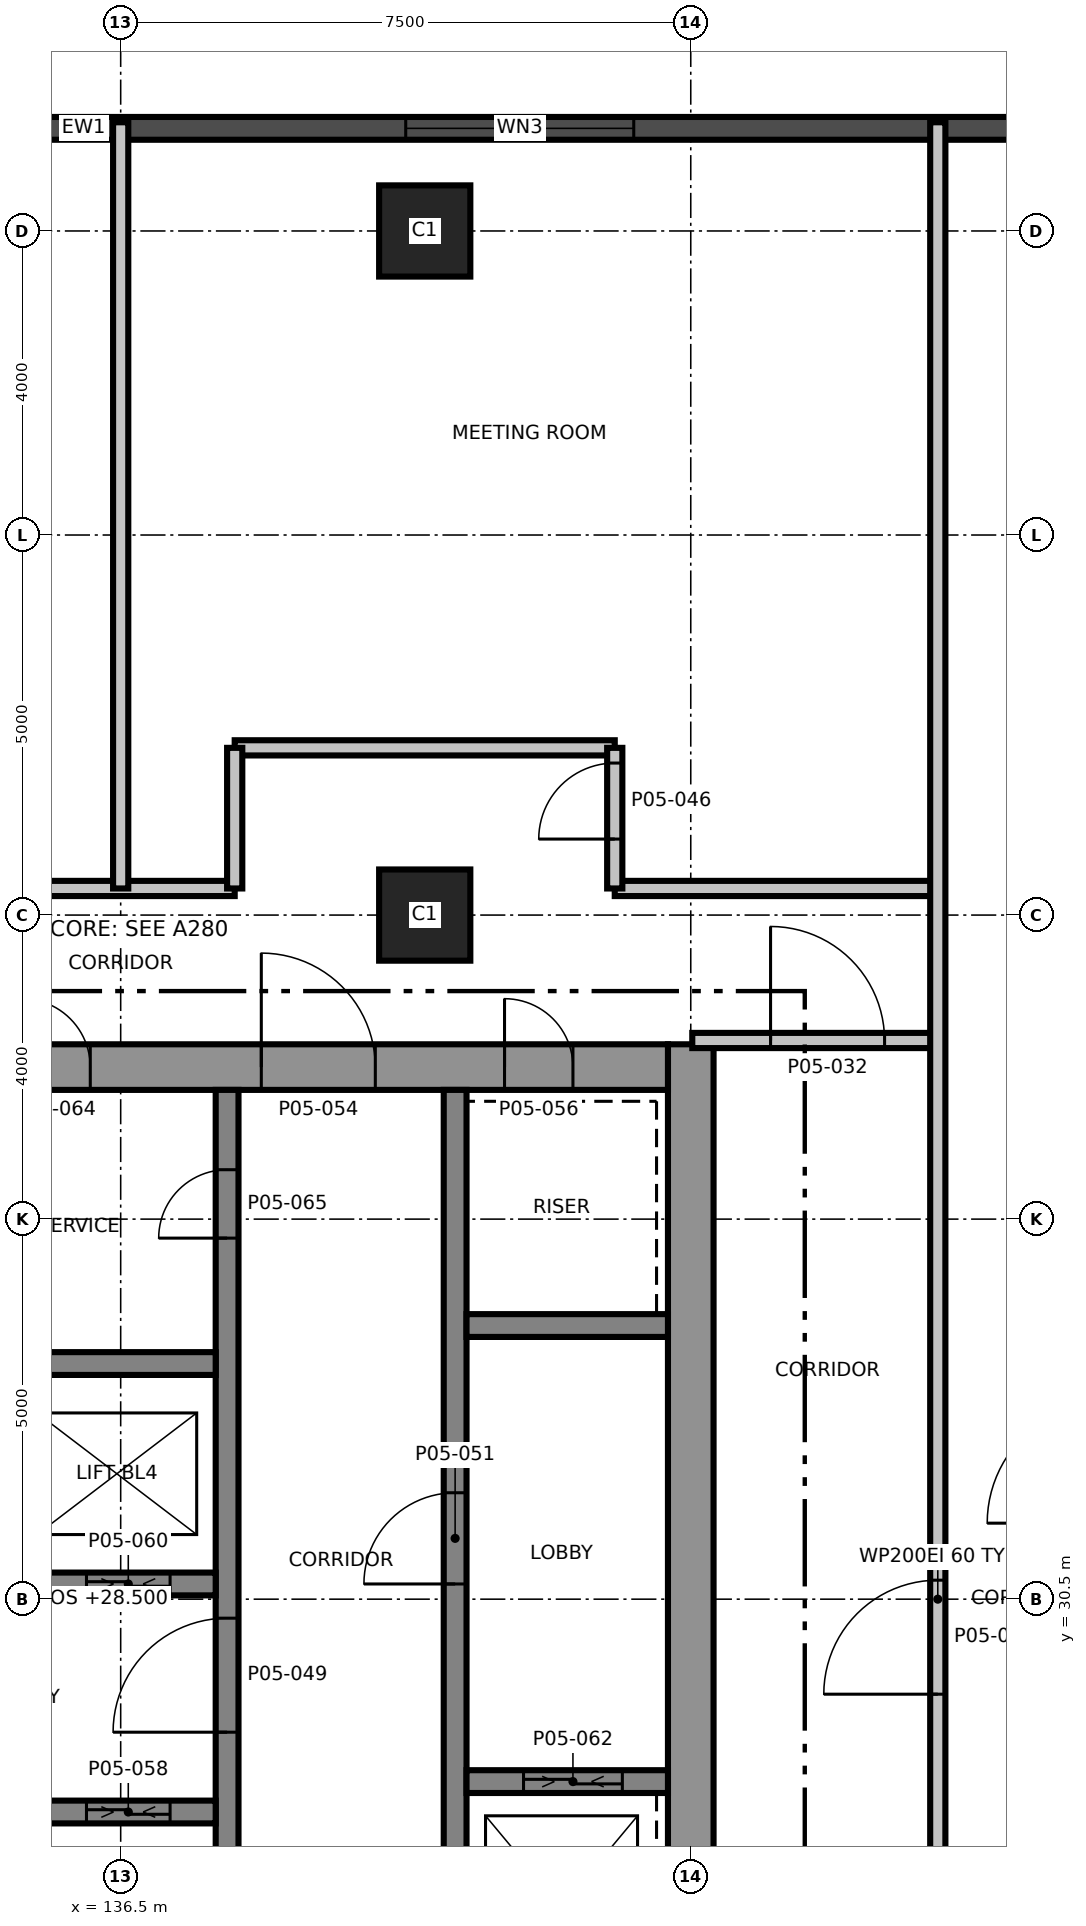
"""IFC4 building model, lengths in metres.
Left out: names, types, materials, properties, quantities, classifications, styles, units other than length and angle.
Written with IfcOpenShell. Run it as: python <this file> out.ifc"""

import sys

from ifc_helpers import new_model, si_unit, direction, frame, frame_2d, origin, origin_2d, place, context, subcontext, project, spatial, rectangle, extrude, element, fill, save


model = new_model("IFC4")
c1 = context("Model", 3, precision=1e-05, world=origin(), true_north=direction((0.0, 1.0)))
c2 = subcontext(c1, "Body", "Model", "MODEL_VIEW")
j1 = project(units=[si_unit("LENGTHUNIT", "METRE"), si_unit("PLANEANGLEUNIT", "RADIAN")], contexts=[c1])
p1 = place(None, origin())
s1 = spatial("IfcSite", under=j1, at=p1, CompositionType="ELEMENT")
p2 = place(p1, origin())
s2 = spatial("IfcBuilding", under=s1, at=p2, CompositionType="ELEMENT")
p3 = place(p2, frame((0.0, 0.0, 28.5)))
s3 = spatial("IfcBuildingStorey", under=s2, at=p3, CompositionType="ELEMENT", Elevation=28.5)
p4 = place(p3, frame((144.0, 24.2, 0.0), z_axis=(0.0, 0.0, 1.0), x_axis=(0.0, 1.0, 0.0)))
e1 = element("IfcWall", 1, at=p4, inside=s3, PredefinedType="SHEAR", context=c2, shape_type="SweptSolid", body=[
    extrude(rectangle(XDim=13.6, YDim=0.6, at=frame_2d((6.8, 0.0))), origin(), (0.0, 0.0, 1.0), 5.0),
])
p5 = place(p3, frame((128.7, 37.5, 0.0), z_axis=(0.0, 0.0, 1.0), x_axis=(1.0, 0.0, 0.0)))
e2 = element("IfcWall", 2, at=p5, inside=s3, PredefinedType="SHEAR", context=c2, shape_type="SweptSolid", body=[
    extrude(rectangle(XDim=15.0, YDim=0.6, at=frame_2d((7.5, 0.0))), origin(), (0.0, 0.0, 1.0), 5.0),
])
p6 = place(p5, frame((9.65, 0.0, 0.0)))
e3 = element("IfcOpeningElement", 3, at=p6, cuts=e2, PredefinedType="OPENING", context=c2, shape_type="SweptSolid", body=[
    extrude(rectangle(XDim=1.5, YDim=2.1, at=frame_2d((0.75, 1.05))), frame((0.0, 0.31, 0.0), z_axis=(0.0, -1.0, 0.0), x_axis=(1.0, 0.0, 0.0)), (0.0, 0.0, 1.0), 0.62),
])
p7 = place(p5, frame((12.85, 0.0, 0.0)))
e4 = element("IfcOpeningElement", 4, at=p7, cuts=e2, PredefinedType="OPENING", context=c2, shape_type="SweptSolid", body=[
    extrude(rectangle(XDim=0.9, YDim=2.1, at=frame_2d((0.45, 1.05))), frame((0.0, 0.31, 0.0), z_axis=(0.0, -1.0, 0.0), x_axis=(1.0, 0.0, 0.0)), (0.0, 0.0, 1.0), 0.62),
])
p8 = place(p5, frame((3.6, 0.0, 0.0)))
e5 = element("IfcOpeningElement", 5, at=p8, cuts=e2, PredefinedType="OPENING", context=c2, shape_type="SweptSolid", body=[
    extrude(rectangle(XDim=0.9, YDim=2.1, at=frame_2d((0.45, 1.05))), frame((0.0, 0.31, 0.0), z_axis=(0.0, -1.0, 0.0), x_axis=(1.0, 0.0, 0.0)), (0.0, 0.0, 1.0), 0.62),
])
p9 = place(p5, frame((6.5, 0.0, 0.0)))
e6 = element("IfcOpeningElement", 6, at=p9, cuts=e2, PredefinedType="OPENING", context=c2, shape_type="SweptSolid", body=[
    extrude(rectangle(XDim=0.9, YDim=2.1, at=frame_2d((0.45, 1.05))), frame((0.0, 0.31, 0.0), z_axis=(0.0, -1.0, 0.0), x_axis=(1.0, 0.0, 0.0)), (0.0, 0.0, 1.0), 0.62),
])
p10 = place(p3, frame((137.9, 24.8, 0.0), z_axis=(0.0, 0.0, 1.0), x_axis=(0.0, 1.0, 0.0)))
e7 = element("IfcWall", 7, at=p10, inside=s3, PredefinedType="SHEAR", context=c2, shape_type="SweptSolid", body=[
    extrude(rectangle(XDim=12.4, YDim=0.3, at=frame_2d((6.2, 0.0))), origin(), (0.0, 0.0, 1.0), 5.0),
])
p11 = place(p10, frame((3.95, 0.0, 0.0)))
e8 = element("IfcOpeningElement", 8, at=p11, cuts=e7, PredefinedType="OPENING", context=c2, shape_type="SweptSolid", body=[
    extrude(rectangle(XDim=1.5, YDim=2.1, at=frame_2d((0.75, 1.05))), frame((0.0, 0.16, 0.0), z_axis=(0.0, -1.0, 0.0), x_axis=(1.0, 0.0, 0.0)), (0.0, 0.0, 1.0), 0.32),
])
p12 = place(p10, frame((10.45, 0.0, 0.0)))
e9 = element("IfcOpeningElement", 9, at=p12, cuts=e7, PredefinedType="OPENING", context=c2, shape_type="SweptSolid", body=[
    extrude(rectangle(XDim=0.9, YDim=2.1, at=frame_2d((0.45, 1.05))), frame((0.0, 0.16, 0.0), z_axis=(0.0, -1.0, 0.0), x_axis=(1.0, 0.0, 0.0)), (0.0, 0.0, 1.0), 0.32),
])
p13 = place(p3, frame((140.9, 24.8, 0.0), z_axis=(0.0, 0.0, 1.0), x_axis=(0.0, 1.0, 0.0)))
e10 = element("IfcWall", 10, at=p13, inside=s3, PredefinedType="SHEAR", context=c2, shape_type="SweptSolid", body=[
    extrude(rectangle(XDim=12.4, YDim=0.3, at=frame_2d((6.2, 0.0))), origin(), (0.0, 0.0, 1.0), 5.0),
])
p14 = place(p13, frame((5.9, 0.0, 0.0)))
e11 = element("IfcOpeningElement", 11, at=p14, cuts=e10, PredefinedType="OPENING", context=c2, shape_type="SweptSolid", body=[
    extrude(rectangle(XDim=1.2, YDim=2.1, at=frame_2d((0.6, 1.05))), frame((0.0, 0.16, 0.0), z_axis=(0.0, -1.0, 0.0), x_axis=(1.0, 0.0, 0.0)), (0.0, 0.0, 1.0), 0.32),
])
p15 = place(p3, frame((132.25, 27.7, 0.0), z_axis=(0.0, 0.0, 1.0), x_axis=(1.0, 0.0, 0.0)))
e12 = element("IfcWall", 12, at=p15, inside=s3, PredefinedType="SHEAR", context=c2, shape_type="SweptSolid", body=[
    extrude(rectangle(XDim=5.5, YDim=0.3, at=frame_2d((2.75, 0.0))), origin(), (0.0, 0.0, 1.0), 5.0),
])
p16 = place(p15, frame((0.9, 0.0, 0.0)))
e13 = element("IfcOpeningElement", 13, at=p16, cuts=e12, PredefinedType="OPENING", context=c2, shape_type="SweptSolid", body=[
    extrude(rectangle(XDim=1.1, YDim=2.4, at=frame_2d((0.55, 1.2))), frame((0.0, 0.16, 0.0), z_axis=(0.0, -1.0, 0.0), x_axis=(1.0, 0.0, 0.0)), (0.0, 0.0, 1.0), 0.32),
])
p17 = place(p15, frame((3.8, 0.0, 0.0)))
e14 = element("IfcOpeningElement", 14, at=p17, cuts=e12, PredefinedType="OPENING", context=c2, shape_type="SweptSolid", body=[
    extrude(rectangle(XDim=1.1, YDim=2.4, at=frame_2d((0.55, 1.2))), frame((0.0, 0.16, 0.0), z_axis=(0.0, -1.0, 0.0), x_axis=(1.0, 0.0, 0.0)), (0.0, 0.0, 1.0), 0.32),
])
p18 = place(p3, frame((132.25, 30.7, 0.0), z_axis=(0.0, 0.0, 1.0), x_axis=(1.0, 0.0, 0.0)))
e15 = element("IfcWall", 15, at=p18, inside=s3, PredefinedType="SHEAR", context=c2, shape_type="SweptSolid", body=[
    extrude(rectangle(XDim=5.5, YDim=0.3, at=frame_2d((2.75, 0.0))), origin(), (0.0, 0.0, 1.0), 5.0),
])
p19 = place(p18, frame((0.9, 0.0, 0.0)))
e16 = element("IfcOpeningElement", 16, at=p19, cuts=e15, PredefinedType="OPENING", context=c2, shape_type="SweptSolid", body=[
    extrude(rectangle(XDim=1.1, YDim=2.4, at=frame_2d((0.55, 1.2))), frame((0.0, 0.16, 0.0), z_axis=(0.0, -1.0, 0.0), x_axis=(1.0, 0.0, 0.0)), (0.0, 0.0, 1.0), 0.32),
])
p20 = place(p18, frame((3.8, 0.0, 0.0)))
e17 = element("IfcOpeningElement", 17, at=p20, cuts=e15, PredefinedType="OPENING", context=c2, shape_type="SweptSolid", body=[
    extrude(rectangle(XDim=1.1, YDim=2.4, at=frame_2d((0.55, 1.2))), frame((0.0, 0.16, 0.0), z_axis=(0.0, -1.0, 0.0), x_axis=(1.0, 0.0, 0.0)), (0.0, 0.0, 1.0), 0.32),
])
p21 = place(p3, frame((132.25, 33.6, 0.0), z_axis=(0.0, 0.0, 1.0), x_axis=(1.0, 0.0, 0.0)))
e18 = element("IfcWall", 18, at=p21, inside=s3, PredefinedType="SHEAR", context=c2, shape_type="SweptSolid", body=[
    extrude(rectangle(XDim=5.5, YDim=0.3, at=frame_2d((2.75, 0.0))), origin(), (0.0, 0.0, 1.0), 5.0),
])
p22 = place(p3, frame((141.05, 28.1, 0.0), z_axis=(0.0, 0.0, 1.0), x_axis=(1.0, 0.0, 0.0)))
e19 = element("IfcWall", 19, at=p22, inside=s3, PredefinedType="SHEAR", context=c2, shape_type="SweptSolid", body=[
    extrude(rectangle(XDim=2.65, YDim=0.3, at=frame_2d((1.325, 0.0))), origin(), (0.0, 0.0, 1.0), 5.0),
])
p23 = place(p22, frame((0.75, 0.0, 0.0)))
e20 = element("IfcOpeningElement", 20, at=p23, cuts=e19, PredefinedType="OPENING", context=c2, shape_type="SweptSolid", body=[
    extrude(rectangle(XDim=1.3, YDim=2.4, at=frame_2d((0.65, 1.2))), frame((0.0, 0.16, 0.0), z_axis=(0.0, -1.0, 0.0), x_axis=(1.0, 0.0, 0.0)), (0.0, 0.0, 1.0), 0.32),
])
p24 = place(p3, frame((141.05, 34.1, 0.0), z_axis=(0.0, 0.0, 1.0), x_axis=(1.0, 0.0, 0.0)))
e21 = element("IfcWall", 21, at=p24, inside=s3, PredefinedType="SHEAR", context=c2, shape_type="SweptSolid", body=[
    extrude(rectangle(XDim=2.65, YDim=0.3, at=frame_2d((1.325, 0.0))), origin(), (0.0, 0.0, 1.0), 5.0),
])
for number, where, z_axis, x_axis in (
    (22, (140.5, 39.5, 0.0), (0.0, 0.0, 1.0), (1.0, 0.0, 0.0)),
    (23, (140.5, 48.5, 0.0), (0.0, 0.0, 1.0), (1.0, 0.0, 0.0)),
):
    element("IfcColumn", number, at=place(p3, frame(where, z_axis=z_axis, x_axis=x_axis)), inside=s3, PredefinedType="COLUMN", context=c2, shape_type="SweptSolid", body=[
        extrude(rectangle(XDim=1.2, YDim=1.2, at=origin_2d()), origin(), (0.0, 0.0, 1.0), 5.0),
    ])
p25 = place(p3, frame((153.952, 49.85, 0.0), z_axis=(0.0, 0.0, 1.0), x_axis=(-1.0, 0.0, 0.0)))
e24 = element("IfcWall", 24, at=p25, inside=s3, PredefinedType="SOLIDWALL", context=c2, shape_type="SweptSolid", body=[
    extrude(rectangle(XDim=35.88, YDim=0.3, at=frame_2d((17.94, 0.0))), origin(), (0.0, 0.0, 1.0), 4.7),
])
p26 = place(p25, frame((1.226, 0.0, 0.9)))
e25 = element("IfcOpeningElement", 25, at=p26, cuts=e24, PredefinedType="OPENING", context=c2, shape_type="SweptSolid", body=[
    extrude(rectangle(XDim=3.0, YDim=2.4, at=frame_2d((1.5, 1.2))), frame((0.0, 0.16, 0.0), z_axis=(0.0, -1.0, 0.0), x_axis=(1.0, 0.0, 0.0)), (0.0, 0.0, 1.0), 0.32),
])
p27 = place(p25, frame((10.702, 0.0, 0.9)))
e26 = element("IfcOpeningElement", 26, at=p27, cuts=e24, PredefinedType="OPENING", context=c2, shape_type="SweptSolid", body=[
    extrude(rectangle(XDim=3.0, YDim=2.4, at=frame_2d((1.5, 1.2))), frame((0.0, 0.16, 0.0), z_axis=(0.0, -1.0, 0.0), x_axis=(1.0, 0.0, 0.0)), (0.0, 0.0, 1.0), 0.32),
])
p28 = place(p25, frame((19.702, 0.0, 0.9)))
e27 = element("IfcOpeningElement", 27, at=p28, cuts=e24, PredefinedType="OPENING", context=c2, shape_type="SweptSolid", body=[
    extrude(rectangle(XDim=3.0, YDim=2.4, at=frame_2d((1.5, 1.2))), frame((0.0, 0.16, 0.0), z_axis=(0.0, -1.0, 0.0), x_axis=(1.0, 0.0, 0.0)), (0.0, 0.0, 1.0), 0.32),
])
p29 = place(p25, frame((24.202, 0.0, 0.9)))
e28 = element("IfcOpeningElement", 28, at=p29, cuts=e24, PredefinedType="OPENING", context=c2, shape_type="SweptSolid", body=[
    extrude(rectangle(XDim=3.0, YDim=2.4, at=frame_2d((1.5, 1.2))), frame((0.0, 0.16, 0.0), z_axis=(0.0, -1.0, 0.0), x_axis=(1.0, 0.0, 0.0)), (0.0, 0.0, 1.0), 0.32),
])
p30 = place(p25, frame((28.702, 0.0, 0.9)))
e29 = element("IfcOpeningElement", 29, at=p30, cuts=e24, PredefinedType="OPENING", context=c2, shape_type="SweptSolid", body=[
    extrude(rectangle(XDim=3.0, YDim=2.4, at=frame_2d((1.5, 1.2))), frame((0.0, 0.16, 0.0), z_axis=(0.0, -1.0, 0.0), x_axis=(1.0, 0.0, 0.0)), (0.0, 0.0, 1.0), 0.32),
])
p31 = place(p3, frame((144.02, 37.85, 0.0), z_axis=(0.0, 0.0, 1.0), x_axis=(1.0, 0.0, 0.0)))
e30 = element("IfcWall", 30, at=p31, inside=s3, PredefinedType="PARTITIONING", context=c2, shape_type="SweptSolid", body=[
    extrude(rectangle(XDim=3.23, YDim=0.2, at=frame_2d((1.615, 0.0))), origin(), (0.0, 0.0, 1.0), 3.8),
])
p32 = place(p31, frame((1.03, 0.0, 0.0)))
e31 = element("IfcOpeningElement", 31, at=p32, cuts=e30, PredefinedType="OPENING", context=c2, shape_type="SweptSolid", body=[
    extrude(rectangle(XDim=1.5, YDim=2.1, at=frame_2d((0.75, 1.05))), frame((0.0, 0.11, 0.0), z_axis=(0.0, -1.0, 0.0), x_axis=(1.0, 0.0, 0.0)), (0.0, 0.0, 1.0), 0.22),
])
p33 = place(p3, frame((134.0, 39.85, 0.0), z_axis=(0.0, 0.0, 1.0), x_axis=(1.0, 0.0, 0.0)))
e32 = element("IfcWall", 32, at=p33, inside=s3, PredefinedType="PARTITIONING", context=c2, shape_type="SweptSolid", body=[
    extrude(rectangle(XDim=4.0, YDim=0.2, at=frame_2d((2.0, 0.0))), origin(), (0.0, 0.0, 1.0), 3.8),
])
p34 = place(p3, frame((143.0, 39.85, 0.0), z_axis=(0.0, 0.0, 1.0), x_axis=(1.0, 0.0, 0.0)))
e33 = element("IfcWall", 33, at=p34, inside=s3, PredefinedType="PARTITIONING", context=c2, shape_type="SweptSolid", body=[
    extrude(rectangle(XDim=4.25, YDim=0.2, at=frame_2d((2.125, 0.0))), origin(), (0.0, 0.0, 1.0), 3.8),
])
p35 = place(p3, frame((138.0, 41.7, 0.0), z_axis=(0.0, 0.0, 1.0), x_axis=(1.0, 0.0, 0.0)))
e34 = element("IfcWall", 34, at=p35, inside=s3, PredefinedType="PARTITIONING", context=c2, shape_type="SweptSolid", body=[
    extrude(rectangle(XDim=5.0, YDim=0.2, at=frame_2d((2.5, 0.0))), origin(), (0.0, 0.0, 1.0), 3.8),
])
p36 = place(p3, frame((136.5, 39.85, 0.0), z_axis=(0.0, 0.0, 1.0), x_axis=(0.0, 1.0, 0.0)))
e35 = element("IfcWall", 35, at=p36, inside=s3, PredefinedType="PARTITIONING", context=c2, shape_type="SweptSolid", body=[
    extrude(rectangle(XDim=10.08, YDim=0.2, at=frame_2d((5.04, 0.0))), origin(), (0.0, 0.0, 1.0), 3.8),
])
p37 = place(p3, frame((138.0, 39.85, 0.0), z_axis=(0.0, 0.0, 1.0), x_axis=(0.0, 1.0, 0.0)))
e36 = element("IfcWall", 36, at=p37, inside=s3, PredefinedType="PARTITIONING", context=c2, shape_type="SweptSolid", body=[
    extrude(rectangle(XDim=1.85, YDim=0.2, at=frame_2d((0.925, 0.0))), origin(), (0.0, 0.0, 1.0), 3.8),
])
p38 = place(p3, frame((143.0, 39.85, 0.0), z_axis=(0.0, 0.0, 1.0), x_axis=(0.0, 1.0, 0.0)))
e37 = element("IfcWall", 37, at=p38, inside=s3, PredefinedType="PARTITIONING", context=c2, shape_type="SweptSolid", body=[
    extrude(rectangle(XDim=1.85, YDim=0.2, at=frame_2d((0.925, 0.0))), origin(), (0.0, 0.0, 1.0), 3.8),
])
p39 = place(p38, frame((0.65, 0.0, 0.0)))
e38 = element("IfcOpeningElement", 38, at=p39, cuts=e37, PredefinedType="OPENING", context=c2, shape_type="SweptSolid", body=[
    extrude(rectangle(XDim=1.0, YDim=2.1, at=frame_2d((0.5, 1.05))), frame((0.0, 0.11, 0.0), z_axis=(0.0, -1.0, 0.0), x_axis=(1.0, 0.0, 0.0)), (0.0, 0.0, 1.0), 0.22),
])
p40 = place(p3, frame((147.25, 11.07, 0.0), z_axis=(0.0, 0.0, 1.0), x_axis=(0.0, 1.0, 0.0)))
e39 = element("IfcWall", 39, at=p40, inside=s3, PredefinedType="PARTITIONING", context=c2, shape_type="SweptSolid", body=[
    extrude(rectangle(XDim=38.86, YDim=0.2, at=frame_2d((19.43, 0.0))), origin(), (0.0, 0.0, 1.0), 3.8),
])
p41 = place(p40, frame((18.18, 0.0, 0.0)))
e40 = element("IfcOpeningElement", 40, at=p41, cuts=e39, PredefinedType="OPENING", context=c2, shape_type="SweptSolid", body=[
    extrude(rectangle(XDim=1.5, YDim=2.1, at=frame_2d((0.75, 1.05))), frame((0.0, 0.11, 0.0), z_axis=(0.0, -1.0, 0.0), x_axis=(1.0, 0.0, 0.0)), (0.0, 0.0, 1.0), 0.22),
])
p42 = place(p40, frame((4.975, 0.0, 0.0)))
e41 = element("IfcOpeningElement", 41, at=p42, cuts=e39, PredefinedType="OPENING", context=c2, shape_type="SweptSolid", body=[
    extrude(rectangle(XDim=1.0, YDim=2.1, at=frame_2d((0.5, 1.05))), frame((0.0, 0.11, 0.0), z_axis=(0.0, -1.0, 0.0), x_axis=(1.0, 0.0, 0.0)), (0.0, 0.0, 1.0), 0.22),
])
p43 = place(p27, origin())
e42 = element("IfcWindow", 42, at=p43, inside=s3, PartitioningType="SINGLE_PANEL", PredefinedType="WINDOW", context=c2, shape_type="SweptSolid", body=[
    extrude(rectangle(XDim=3.0, YDim=2.4, at=frame_2d((1.5, 1.2))), frame((0.0, 0.03, 0.0), z_axis=(0.0, -1.0, 0.0), x_axis=(1.0, 0.0, 0.0)), (0.0, 0.0, 1.0), 0.06),
])
fill(e26, e42)
p44 = place(p32, origin())
e43 = element("IfcDoor", 43, at=p44, inside=s3, OperationType="SINGLE_SWING_RIGHT", PredefinedType="DOOR", context=c2, shape_type="SweptSolid", body=[
    extrude(rectangle(XDim=1.5, YDim=2.1, at=frame_2d((0.75, 1.05))), frame((0.0, 0.025, 0.0), z_axis=(0.0, -1.0, 0.0), x_axis=(1.0, 0.0, 0.0)), (0.0, 0.0, 1.0), 0.05),
])
fill(e31, e43)
p45 = place(p41, origin())
e44 = element("IfcDoor", 44, at=p45, inside=s3, OperationType="SINGLE_SWING_RIGHT", PredefinedType="DOOR", context=c2, shape_type="SweptSolid", body=[
    extrude(rectangle(XDim=1.5, YDim=2.1, at=frame_2d((0.75, 1.05))), frame((0.0, 0.025, 0.0), z_axis=(0.0, -1.0, 0.0), x_axis=(1.0, 0.0, 0.0)), (0.0, 0.0, 1.0), 0.05),
])
fill(e40, e44)
p46 = place(p39, origin())
e45 = element("IfcDoor", 45, at=p46, inside=s3, OperationType="SINGLE_SWING_RIGHT", PredefinedType="DOOR", context=c2, shape_type="SweptSolid", body=[
    extrude(rectangle(XDim=1.0, YDim=2.1, at=frame_2d((0.5, 1.05))), frame((0.0, 0.025, 0.0), z_axis=(0.0, -1.0, 0.0), x_axis=(1.0, 0.0, 0.0)), (0.0, 0.0, 1.0), 0.05),
])
fill(e38, e45)
p47 = place(p11, origin())
e46 = element("IfcDoor", 46, at=p47, inside=s3, OperationType="SINGLE_SWING_RIGHT", PredefinedType="DOOR", context=c2, shape_type="SweptSolid", body=[
    extrude(rectangle(XDim=1.5, YDim=2.1, at=frame_2d((0.75, 1.05))), frame((0.0, 0.025, 0.0), z_axis=(0.0, -1.0, 0.0), x_axis=(1.0, 0.0, 0.0)), (0.0, 0.0, 1.0), 0.05),
])
fill(e8, e46)
p48 = place(p14, origin())
e47 = element("IfcDoor", 47, at=p48, inside=s3, OperationType="SINGLE_SWING_RIGHT", PredefinedType="DOOR", context=c2, shape_type="SweptSolid", body=[
    extrude(rectangle(XDim=1.2, YDim=2.1, at=frame_2d((0.6, 1.05))), frame((0.0, 0.025, 0.0), z_axis=(0.0, -1.0, 0.0), x_axis=(1.0, 0.0, 0.0)), (0.0, 0.0, 1.0), 0.05),
])
fill(e11, e47)
p49 = place(p6, origin())
e48 = element("IfcDoor", 48, at=p49, inside=s3, OperationType="SINGLE_SWING_RIGHT", PredefinedType="DOOR", context=c2, shape_type="SweptSolid", body=[
    extrude(rectangle(XDim=1.5, YDim=2.1, at=frame_2d((0.75, 1.05))), frame((0.0, 0.025, 0.0), z_axis=(0.0, -1.0, 0.0), x_axis=(1.0, 0.0, 0.0)), (0.0, 0.0, 1.0), 0.05),
])
fill(e3, e48)
p50 = place(p7, origin())
e49 = element("IfcDoor", 49, at=p50, inside=s3, OperationType="SINGLE_SWING_RIGHT", PredefinedType="DOOR", context=c2, shape_type="SweptSolid", body=[
    extrude(rectangle(XDim=0.9, YDim=2.1, at=frame_2d((0.45, 1.05))), frame((0.0, 0.025, 0.0), z_axis=(0.0, -1.0, 0.0), x_axis=(1.0, 0.0, 0.0)), (0.0, 0.0, 1.0), 0.05),
])
fill(e4, e49)
p51 = place(p17, origin())
e50 = element("IfcDoor", 50, at=p51, inside=s3, OperationType="SLIDING_TO_LEFT", PredefinedType="DOOR", context=c2, shape_type="SweptSolid", body=[
    extrude(rectangle(XDim=1.1, YDim=2.4, at=frame_2d((0.55, 1.2))), frame((0.0, 0.025, 0.0), z_axis=(0.0, -1.0, 0.0), x_axis=(1.0, 0.0, 0.0)), (0.0, 0.0, 1.0), 0.05),
])
fill(e14, e50)
p52 = place(p20, origin())
e51 = element("IfcDoor", 51, at=p52, inside=s3, OperationType="SLIDING_TO_LEFT", PredefinedType="DOOR", context=c2, shape_type="SweptSolid", body=[
    extrude(rectangle(XDim=1.1, YDim=2.4, at=frame_2d((0.55, 1.2))), frame((0.0, 0.025, 0.0), z_axis=(0.0, -1.0, 0.0), x_axis=(1.0, 0.0, 0.0)), (0.0, 0.0, 1.0), 0.05),
])
fill(e17, e51)
p53 = place(p23, origin())
e52 = element("IfcDoor", 52, at=p53, inside=s3, OperationType="SLIDING_TO_LEFT", PredefinedType="DOOR", context=c2, shape_type="SweptSolid", body=[
    extrude(rectangle(XDim=1.3, YDim=2.4, at=frame_2d((0.65, 1.2))), frame((0.0, 0.025, 0.0), z_axis=(0.0, -1.0, 0.0), x_axis=(1.0, 0.0, 0.0)), (0.0, 0.0, 1.0), 0.05),
])
fill(e20, e52)
p54 = place(p9, origin())
e53 = element("IfcDoor", 53, at=p54, inside=s3, OperationType="SINGLE_SWING_RIGHT", PredefinedType="DOOR", context=c2, shape_type="SweptSolid", body=[
    extrude(rectangle(XDim=0.9, YDim=2.1, at=frame_2d((0.45, 1.05))), frame((0.0, 0.025, 0.0), z_axis=(0.0, -1.0, 0.0), x_axis=(1.0, 0.0, 0.0)), (0.0, 0.0, 1.0), 0.05),
])
fill(e6, e53)
p55 = place(p12, origin())
e54 = element("IfcDoor", 54, at=p55, inside=s3, OperationType="SINGLE_SWING_RIGHT", PredefinedType="DOOR", context=c2, shape_type="SweptSolid", body=[
    extrude(rectangle(XDim=0.9, YDim=2.1, at=frame_2d((0.45, 1.05))), frame((0.0, 0.025, 0.0), z_axis=(0.0, -1.0, 0.0), x_axis=(1.0, 0.0, 0.0)), (0.0, 0.0, 1.0), 0.05),
])
fill(e9, e54)
save(model, sys.argv[1])
